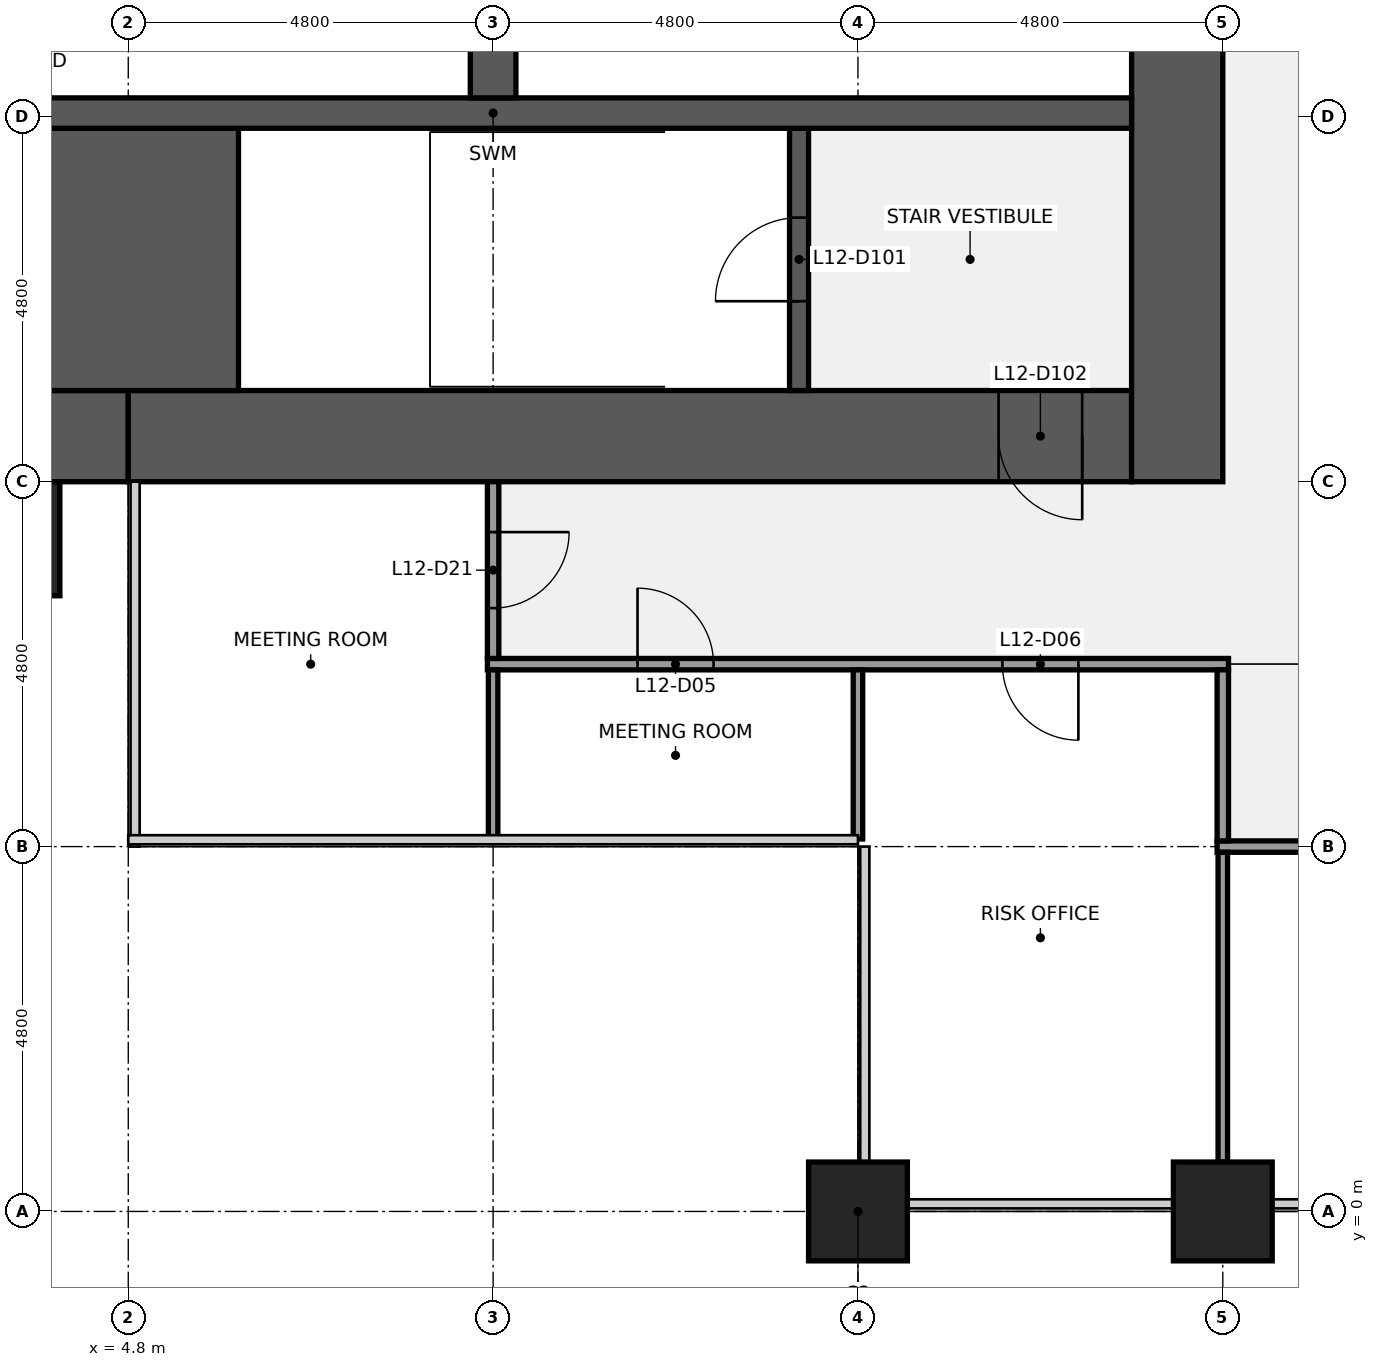
"""IFC4 building model, lengths in metres.
Left out: names, types, materials, properties, quantities, classifications, styles, units other than length and angle.
Written with IfcOpenShell. Run it as: python <this file> out.ifc"""

import sys

from ifc_helpers import new_model, si_unit, direction, frame, frame_2d, origin, origin_2d, place, context, subcontext, project, spatial, rectangle, extrude, element, fill, save


model = new_model("IFC4")
c1 = context("Model", 3, precision=1e-05, world=origin(), true_north=direction((0.0, 1.0)))
c2 = subcontext(c1, "Body", "Model", "MODEL_VIEW")
j1 = project(units=[si_unit("LENGTHUNIT", "METRE"), si_unit("PLANEANGLEUNIT", "RADIAN")], contexts=[c1])
p1 = place(None, origin())
s1 = spatial("IfcSite", under=j1, at=p1, CompositionType="ELEMENT")
p2 = place(p1, origin())
s2 = spatial("IfcBuilding", under=s1, at=p2, CompositionType="ELEMENT")
p3 = place(p2, frame((0.0, 0.0, 59.0)))
s3 = spatial("IfcBuildingStorey", under=s2, at=p3, CompositionType="ELEMENT", Elevation=59.0)
for number, where, z_axis, x_axis in (
    (1, (14.4, 0.0, 0.0), (0.0, 0.0, 1.0), (1.0, 0.0, 0.0)),
    (2, (19.2, 0.0, 0.0), (0.0, 0.0, 1.0), (1.0, 0.0, 0.0)),
):
    element("IfcColumn", number, at=place(p3, frame(where, z_axis=z_axis, x_axis=x_axis)), inside=s3, PredefinedType="COLUMN", context=c2, shape_type="SweptSolid", body=[
        extrude(rectangle(XDim=1.3, YDim=1.3, at=origin_2d()), origin(), (0.0, 0.0, 1.0), 4.0),
    ])
p4 = place(p3, frame((4.8, 10.2, 0.0), z_axis=(0.0, 0.0, 1.0), x_axis=(-1.0, 0.0, 0.0)))
e3 = element("IfcWall", 3, at=p4, inside=s3, PredefinedType="SHEAR", context=c2, shape_type="SweptSolid", body=[
    extrude(rectangle(XDim=3.6, YDim=1.2, at=frame_2d((1.8, 0.0))), origin(), (0.0, 0.0, 1.0), 3.84),
])
p5 = place(p3, frame((18.0, 10.2, 0.0), z_axis=(0.0, 0.0, 1.0), x_axis=(-1.0, 0.0, 0.0)))
e4 = element("IfcWall", 4, at=p5, inside=s3, PredefinedType="SHEAR", context=c2, shape_type="SweptSolid", body=[
    extrude(rectangle(XDim=13.2, YDim=1.2, at=frame_2d((6.6, 0.0))), origin(), (0.0, 0.0, 1.0), 3.84),
])
p6 = place(p5, frame((0.65, 0.0, 0.0)))
e5 = element("IfcOpeningElement", 5, at=p6, cuts=e4, PredefinedType="OPENING", context=c2, shape_type="SweptSolid", body=[
    extrude(rectangle(XDim=1.1, YDim=2.1, at=frame_2d((0.55, 1.05))), frame((0.0, 0.61, 0.0), z_axis=(0.0, -1.0, 0.0), x_axis=(1.0, 0.0, 0.0)), (0.0, 0.0, 1.0), 1.22),
])
p7 = place(p3, frame((18.6, 38.4, 0.0), z_axis=(0.0, 0.0, 1.0), x_axis=(0.0, -1.0, 0.0)))
e6 = element("IfcWall", 6, at=p7, inside=s3, PredefinedType="SHEAR", context=c2, shape_type="SweptSolid", body=[
    extrude(rectangle(XDim=28.8, YDim=1.2, at=frame_2d((14.4, 0.0))), origin(), (0.0, 0.0, 1.0), 3.84),
])
p8 = place(p7, frame((18.3, 0.0, 0.0)))
e7 = element("IfcOpeningElement", 7, at=p8, cuts=e6, PredefinedType="OPENING", context=c2, shape_type="SweptSolid", body=[
    extrude(rectangle(XDim=1.8, YDim=2.1, at=frame_2d((0.9, 1.05))), frame((0.0, 0.61, 0.0), z_axis=(0.0, -1.0, 0.0), x_axis=(1.0, 0.0, 0.0)), (0.0, 0.0, 1.0), 1.22),
])
p9 = place(p7, frame((8.7, 0.0, 0.0)))
e8 = element("IfcOpeningElement", 8, at=p9, cuts=e6, PredefinedType="OPENING", context=c2, shape_type="SweptSolid", body=[
    extrude(rectangle(XDim=1.8, YDim=2.1, at=frame_2d((0.9, 1.05))), frame((0.0, 0.61, 0.0), z_axis=(0.0, -1.0, 0.0), x_axis=(1.0, 0.0, 0.0)), (0.0, 0.0, 1.0), 1.22),
])
p10 = place(p3, frame((1.2, 12.525, 0.0), z_axis=(0.0, 0.0, 1.0), x_axis=(1.0, 0.0, 0.0)))
e9 = element("IfcWall", 9, at=p10, inside=s3, PredefinedType="SHEAR", context=c2, shape_type="SweptSolid", body=[
    extrude(rectangle(XDim=5.05, YDim=3.45, at=frame_2d((2.525, 0.0))), origin(), (0.0, 0.0, 1.0), 3.84),
])
p11 = place(p3, frame((13.625, 10.8, 0.0), z_axis=(0.0, 0.0, 1.0), x_axis=(0.0, 1.0, 0.0)))
e10 = element("IfcWall", 10, at=p11, inside=s3, PredefinedType="SHEAR", context=c2, shape_type="SweptSolid", body=[
    extrude(rectangle(XDim=3.45, YDim=0.25, at=frame_2d((1.725, 0.0))), origin(), (0.0, 0.0, 1.0), 3.84),
])
p12 = place(p11, frame((1.175, 0.0, 0.0)))
e11 = element("IfcOpeningElement", 11, at=p12, cuts=e10, PredefinedType="OPENING", context=c2, shape_type="SweptSolid", body=[
    extrude(rectangle(XDim=1.1, YDim=2.1, at=frame_2d((0.55, 1.05))), frame((0.0, 0.135, 0.0), z_axis=(0.0, -1.0, 0.0), x_axis=(1.0, 0.0, 0.0)), (0.0, 0.0, 1.0), 0.27),
])
p13 = place(p3, frame((1.2, 14.45, 0.0), z_axis=(0.0, 0.0, 1.0), x_axis=(1.0, 0.0, 0.0)))
e12 = element("IfcWall", 12, at=p13, inside=s3, PredefinedType="SHEAR", context=c2, shape_type="SweptSolid", body=[
    extrude(rectangle(XDim=16.8, YDim=0.4, at=frame_2d((8.4, 0.0))), origin(), (0.0, 0.0, 1.0), 3.84),
])
p14 = place(p3, frame((9.6, 14.65, 0.0), z_axis=(0.0, 0.0, 1.0), x_axis=(0.0, 1.0, 0.0)))
e13 = element("IfcWall", 13, at=p14, inside=s3, PredefinedType="SHEAR", context=c2, shape_type="SweptSolid", body=[
    extrude(rectangle(XDim=2.6, YDim=0.6, at=frame_2d((1.3, 0.0))), origin(), (0.0, 0.0, 1.0), 3.84),
])
p15 = place(p3, frame((19.125, 4.8, 0.0), z_axis=(0.0, 0.0, 1.0), x_axis=(1.0, 0.0, 0.0)))
e14 = element("IfcWall", 14, at=p15, inside=s3, PredefinedType="PARTITIONING", context=c2, shape_type="SweptSolid", body=[
    extrude(rectangle(XDim=19.35, YDim=0.15, at=frame_2d((9.675, 0.0))), origin(), (0.0, 0.0, 1.0), 2.87),
])
p16 = place(p15, frame((4.375, 0.0, 0.0)))
e15 = element("IfcOpeningElement", 15, at=p16, cuts=e14, PredefinedType="OPENING", context=c2, shape_type="SweptSolid", body=[
    extrude(rectangle(XDim=1.0, YDim=2.1, at=frame_2d((0.5, 1.05))), frame((0.0, 0.085, 0.0), z_axis=(0.0, -1.0, 0.0), x_axis=(1.0, 0.0, 0.0)), (0.0, 0.0, 1.0), 0.17),
])
p17 = place(p15, frame((10.375, 0.0, 0.0)))
e16 = element("IfcOpeningElement", 16, at=p17, cuts=e14, PredefinedType="OPENING", context=c2, shape_type="SweptSolid", body=[
    extrude(rectangle(XDim=1.0, YDim=2.1, at=frame_2d((0.5, 1.05))), frame((0.0, 0.085, 0.0), z_axis=(0.0, -1.0, 0.0), x_axis=(1.0, 0.0, 0.0)), (0.0, 0.0, 1.0), 0.17),
])
p18 = place(p15, frame((13.975, 0.0, 0.0)))
e17 = element("IfcOpeningElement", 17, at=p18, cuts=e14, PredefinedType="OPENING", context=c2, shape_type="SweptSolid", body=[
    extrude(rectangle(XDim=1.0, YDim=2.1, at=frame_2d((0.5, 1.05))), frame((0.0, 0.085, 0.0), z_axis=(0.0, -1.0, 0.0), x_axis=(1.0, 0.0, 0.0)), (0.0, 0.0, 1.0), 0.17),
])
p19 = place(p15, frame((17.575, 0.0, 0.0)))
e18 = element("IfcOpeningElement", 18, at=p19, cuts=e14, PredefinedType="OPENING", context=c2, shape_type="SweptSolid", body=[
    extrude(rectangle(XDim=1.0, YDim=2.1, at=frame_2d((0.5, 1.05))), frame((0.0, 0.085, 0.0), z_axis=(0.0, -1.0, 0.0), x_axis=(1.0, 0.0, 0.0)), (0.0, 0.0, 1.0), 0.17),
])
p20 = place(p3, frame((9.525, 7.2, 0.0), z_axis=(0.0, 0.0, 1.0), x_axis=(1.0, 0.0, 0.0)))
e19 = element("IfcWall", 19, at=p20, inside=s3, PredefinedType="PARTITIONING", context=c2, shape_type="SweptSolid", body=[
    extrude(rectangle(XDim=9.75, YDim=0.15, at=frame_2d((4.875, 0.0))), origin(), (0.0, 0.0, 1.0), 2.87),
])
p21 = place(p20, frame((1.975, 0.0, 0.0)))
e20 = element("IfcOpeningElement", 20, at=p21, cuts=e19, PredefinedType="OPENING", context=c2, shape_type="SweptSolid", body=[
    extrude(rectangle(XDim=1.0, YDim=2.1, at=frame_2d((0.5, 1.05))), frame((0.0, 0.085, 0.0), z_axis=(0.0, -1.0, 0.0), x_axis=(1.0, 0.0, 0.0)), (0.0, 0.0, 1.0), 0.17),
])
p22 = place(p20, frame((6.775, 0.0, 0.0)))
e21 = element("IfcOpeningElement", 21, at=p22, cuts=e19, PredefinedType="OPENING", context=c2, shape_type="SweptSolid", body=[
    extrude(rectangle(XDim=1.0, YDim=2.1, at=frame_2d((0.5, 1.05))), frame((0.0, 0.085, 0.0), z_axis=(0.0, -1.0, 0.0), x_axis=(1.0, 0.0, 0.0)), (0.0, 0.0, 1.0), 0.17),
])
p23 = place(p3, frame((9.6, 4.9, 0.0), z_axis=(0.0, 0.0, 1.0), x_axis=(0.0, 1.0, 0.0)))
e22 = element("IfcWall", 22, at=p23, inside=s3, PredefinedType="PARTITIONING", context=c2, shape_type="SweptSolid", body=[
    extrude(rectangle(XDim=2.225, YDim=0.125, at=frame_2d((1.113, 0.0))), origin(), (0.0, 0.0, 1.0), 2.87),
])
p24 = place(p3, frame((9.6, 7.275, 0.0), z_axis=(0.0, 0.0, 1.0), x_axis=(0.0, 1.0, 0.0)))
e23 = element("IfcWall", 23, at=p24, inside=s3, PredefinedType="PARTITIONING", context=c2, shape_type="SweptSolid", body=[
    extrude(rectangle(XDim=2.325, YDim=0.15, at=frame_2d((1.163, 0.0))), origin(), (0.0, 0.0, 1.0), 2.87),
])
p25 = place(p24, frame((0.663, 0.0, 0.0)))
e24 = element("IfcOpeningElement", 24, at=p25, cuts=e23, PredefinedType="OPENING", context=c2, shape_type="SweptSolid", body=[
    extrude(rectangle(XDim=1.0, YDim=2.1, at=frame_2d((0.5, 1.05))), frame((0.0, 0.085, 0.0), z_axis=(0.0, -1.0, 0.0), x_axis=(1.0, 0.0, 0.0)), (0.0, 0.0, 1.0), 0.17),
])
p26 = place(p3, frame((14.4, 4.9, 0.0), z_axis=(0.0, 0.0, 1.0), x_axis=(0.0, 1.0, 0.0)))
e25 = element("IfcWall", 25, at=p26, inside=s3, PredefinedType="PARTITIONING", context=c2, shape_type="SweptSolid", body=[
    extrude(rectangle(XDim=2.225, YDim=0.125, at=frame_2d((1.113, 0.0))), origin(), (0.0, 0.0, 1.0), 2.87),
])
p27 = place(p3, frame((19.2, 0.65, 0.0), z_axis=(0.0, 0.0, 1.0), x_axis=(0.0, 1.0, 0.0)))
e26 = element("IfcWall", 26, at=p27, inside=s3, PredefinedType="PARTITIONING", context=c2, shape_type="SweptSolid", body=[
    extrude(rectangle(XDim=4.075, YDim=0.125, at=frame_2d((2.038, 0.0))), origin(), (0.0, 0.0, 1.0), 2.87),
])
p28 = place(p3, frame((19.2, 4.875, 0.0), z_axis=(0.0, 0.0, 1.0), x_axis=(0.0, 1.0, 0.0)))
e27 = element("IfcWall", 27, at=p28, inside=s3, PredefinedType="PARTITIONING", context=c2, shape_type="SweptSolid", body=[
    extrude(rectangle(XDim=2.25, YDim=0.15, at=frame_2d((1.125, 0.0))), origin(), (0.0, 0.0, 1.0), 2.87),
])
p29 = place(p3, frame((2.4, 8.85, 0.0), z_axis=(0.0, 0.0, 1.0), x_axis=(1.0, 0.0, 0.0)))
e28 = element("IfcColumn", 28, at=p29, inside=s3, PredefinedType="PILASTER", context=c2, shape_type="SweptSolid", body=[
    extrude(rectangle(XDim=3.0, YDim=1.5, at=origin_2d()), origin(), (0.0, 0.0, 1.0), 4.0),
])
for number, where, z_axis, x_axis in (
    (29, (14.4, -1.075, 0.0), (0.0, 0.0, 1.0), (1.0, 0.0, 0.0)),
    (30, (19.2, -1.075, 0.0), (0.0, 0.0, 1.0), (1.0, 0.0, 0.0)),
):
    element("IfcColumn", number, at=place(p3, frame(where, z_axis=z_axis, x_axis=x_axis)), inside=s3, PredefinedType="PILASTER", context=c2, shape_type="SweptSolid", body=[
        extrude(rectangle(XDim=4.2, YDim=0.85, at=origin_2d()), origin(), (0.0, 0.0, 1.0), 4.0),
    ])
p30 = place(p12, origin())
e31 = element("IfcDoor", 31, at=p30, inside=s3, OperationType="SINGLE_SWING_LEFT", PredefinedType="DOOR", context=c2, shape_type="SweptSolid", body=[
    extrude(rectangle(XDim=1.1, YDim=2.1, at=frame_2d((0.55, 1.05))), frame((0.0, 0.025, 0.0), z_axis=(0.0, -1.0, 0.0), x_axis=(1.0, 0.0, 0.0)), (0.0, 0.0, 1.0), 0.05),
])
fill(e11, e31)
p31 = place(p6, origin())
e32 = element("IfcDoor", 32, at=p31, inside=s3, OperationType="SINGLE_SWING_LEFT", PredefinedType="DOOR", context=c2, shape_type="SweptSolid", body=[
    extrude(rectangle(XDim=1.1, YDim=2.1, at=frame_2d((0.55, 1.05))), frame((0.0, 0.025, 0.0), z_axis=(0.0, -1.0, 0.0), x_axis=(1.0, 0.0, 0.0)), (0.0, 0.0, 1.0), 0.05),
])
fill(e5, e32)
p32 = place(p21, origin())
e33 = element("IfcDoor", 33, at=p32, inside=s3, OperationType="SINGLE_SWING_LEFT", PredefinedType="DOOR", context=c2, shape_type="SweptSolid", body=[
    extrude(rectangle(XDim=1.0, YDim=2.1, at=frame_2d((0.5, 1.05))), frame((0.0, 0.025, 0.0), z_axis=(0.0, -1.0, 0.0), x_axis=(1.0, 0.0, 0.0)), (0.0, 0.0, 1.0), 0.05),
])
fill(e20, e33)
p33 = place(p22, origin())
e34 = element("IfcDoor", 34, at=p33, inside=s3, OperationType="SINGLE_SWING_RIGHT", PredefinedType="DOOR", context=c2, shape_type="SweptSolid", body=[
    extrude(rectangle(XDim=1.0, YDim=2.1, at=frame_2d((0.5, 1.05))), frame((0.0, 0.025, 0.0), z_axis=(0.0, -1.0, 0.0), x_axis=(1.0, 0.0, 0.0)), (0.0, 0.0, 1.0), 0.05),
])
fill(e21, e34)
p34 = place(p25, origin())
e35 = element("IfcDoor", 35, at=p34, inside=s3, OperationType="SINGLE_SWING_RIGHT", PredefinedType="DOOR", context=c2, shape_type="SweptSolid", body=[
    extrude(rectangle(XDim=1.0, YDim=2.1, at=frame_2d((0.5, 1.05))), frame((0.0, 0.025, 0.0), z_axis=(0.0, -1.0, 0.0), x_axis=(1.0, 0.0, 0.0)), (0.0, 0.0, 1.0), 0.05),
])
fill(e24, e35)
save(model, sys.argv[1])
